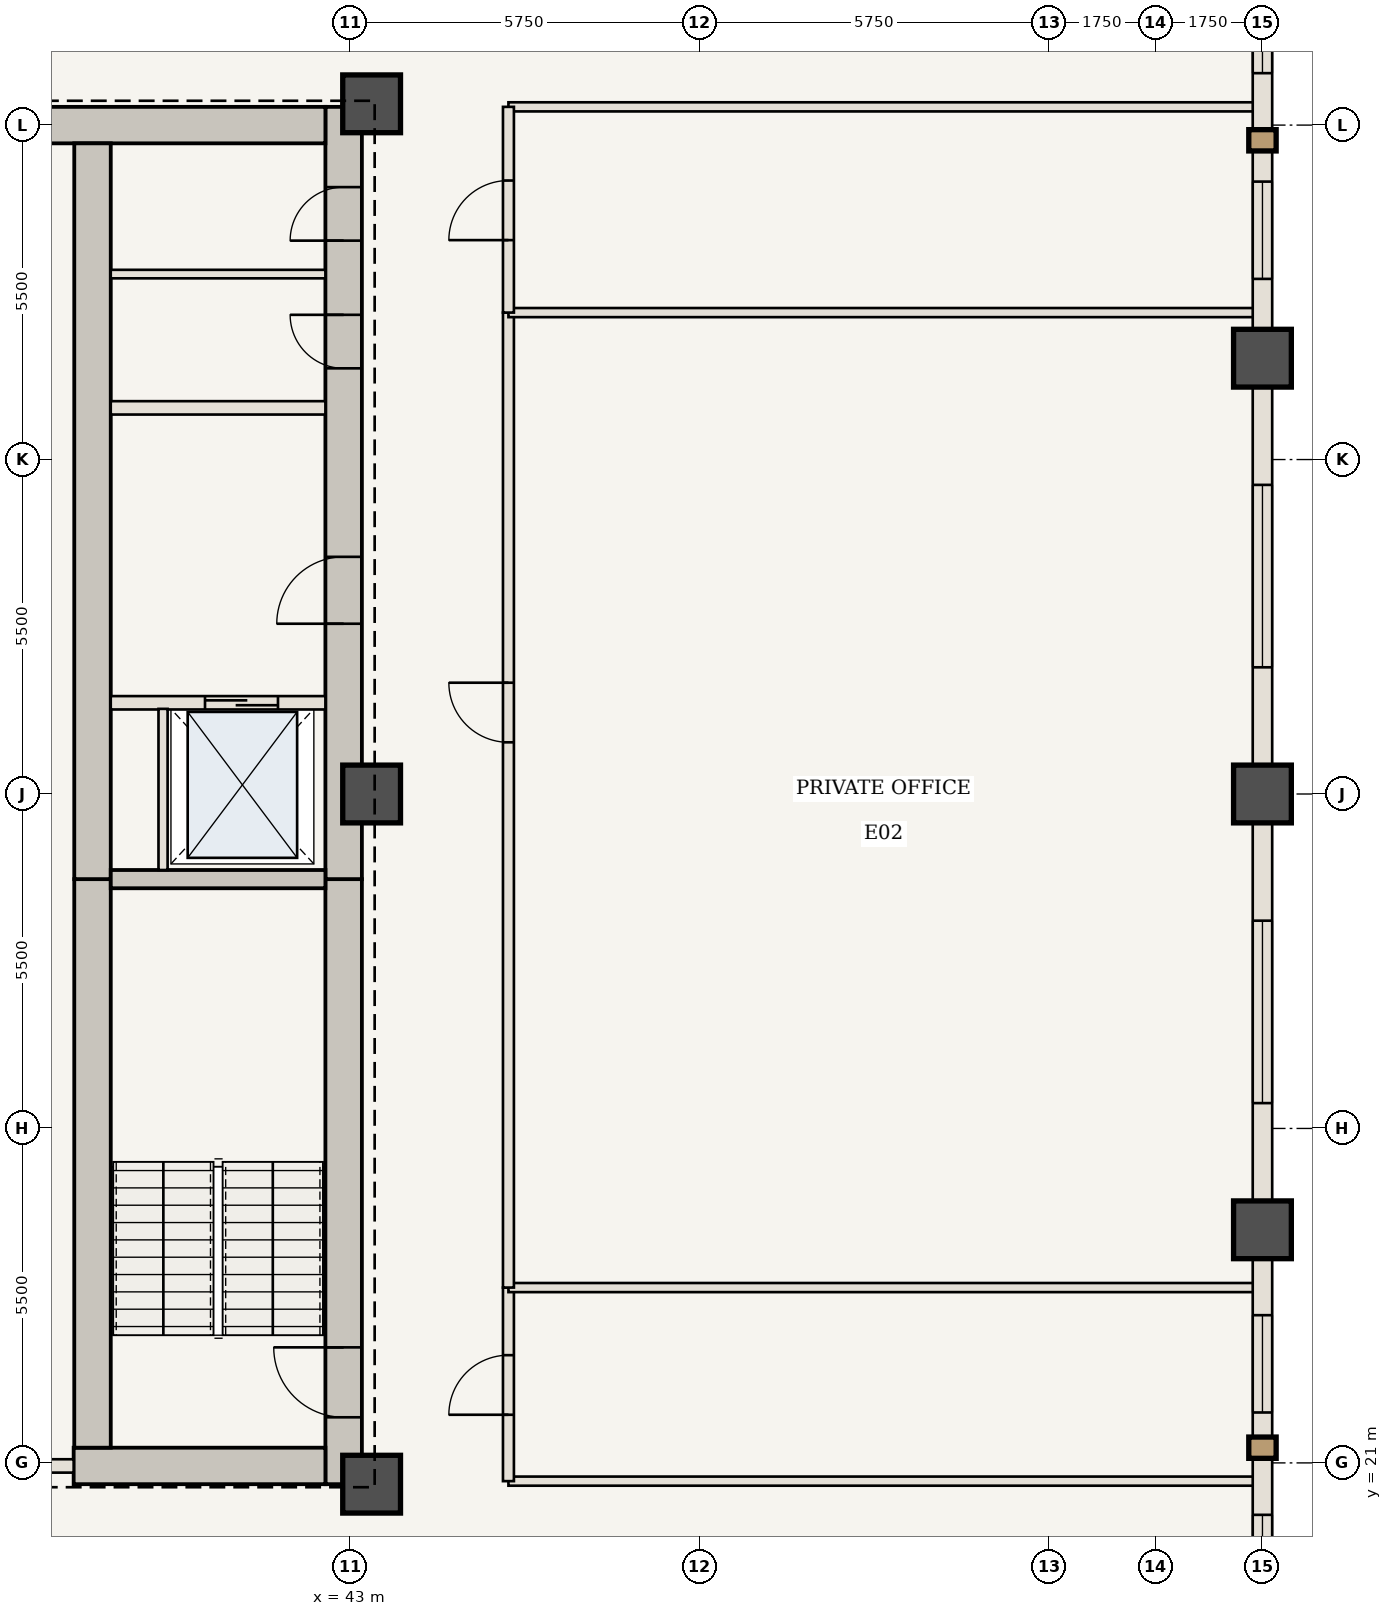
"""IFC4 building model, lengths in metres.
Left out: names, types, materials, properties, quantities, classifications, styles, units other than length and angle.
Written with IfcOpenShell. Run it as: python <this file> out.ifc"""

import sys

from ifc_helpers import new_model, si_unit, direction, frame, frame_2d, origin, origin_2d, place, context, subcontext, project, spatial, rectangle, extrude, element, fill, save


model = new_model("IFC4")
c1 = context("Model", 3, precision=1e-05, world=origin(), true_north=direction((0.0, 1.0)))
c2 = subcontext(c1, "Body", "Model", "MODEL_VIEW")
j1 = project(units=[si_unit("LENGTHUNIT", "METRE"), si_unit("PLANEANGLEUNIT", "RADIAN")], contexts=[c1])
p1 = place(None, origin())
s1 = spatial("IfcSite", under=j1, at=p1, CompositionType="ELEMENT")
p2 = place(p1, origin())
s2 = spatial("IfcBuilding", under=s1, at=p2, CompositionType="ELEMENT")
p3 = place(p2, frame((0.0, 0.0, 114.45)))
s3 = spatial("IfcBuildingStorey", under=s2, at=p3, CompositionType="ELEMENT", Elevation=114.45)
p4 = place(p3, frame((42.89, 20.65, 0.0), z_axis=(0.0, 0.0, 1.0), x_axis=(0.0, 1.0, 0.0)))
e1 = element("IfcWall", 1, at=p4, inside=s3, PredefinedType="SHEAR", context=c2, shape_type="SweptSolid", body=[
    extrude(rectangle(XDim=9.95, YDim=0.6, at=frame_2d((4.975, 0.0))), origin(), (0.0, 0.0, 1.0), 3.85),
])
p5 = place(p4, frame((1.1, 0.0, 0.0)))
e2 = element("IfcOpeningElement", 2, at=p5, cuts=e1, PredefinedType="OPENING", context=c2, shape_type="SweptSolid", body=[
    extrude(rectangle(XDim=1.15, YDim=2.15, at=frame_2d((0.575, 1.075))), frame((0.0, 0.31, 0.0), z_axis=(0.0, -1.0, 0.0), x_axis=(1.0, 0.0, 0.0)), (0.0, 0.0, 1.0), 0.62),
])
p6 = place(p3, frame((42.89, 30.6, 0.0), z_axis=(0.0, 0.0, 1.0), x_axis=(0.0, 1.0, 0.0)))
e3 = element("IfcWall", 3, at=p6, inside=s3, PredefinedType="SHEAR", context=c2, shape_type="SweptSolid", body=[
    extrude(rectangle(XDim=12.7, YDim=0.6, at=frame_2d((6.35, 0.0))), origin(), (0.0, 0.0, 1.0), 3.85),
])
p7 = place(p6, frame((4.2, 0.0, 0.0)))
e4 = element("IfcOpeningElement", 4, at=p7, cuts=e3, PredefinedType="OPENING", context=c2, shape_type="SweptSolid", body=[
    extrude(rectangle(XDim=1.1, YDim=2.15, at=frame_2d((0.55, 1.075))), frame((0.0, 0.31, 0.0), z_axis=(0.0, -1.0, 0.0), x_axis=(1.0, 0.0, 0.0)), (0.0, 0.0, 1.0), 0.62),
])
p8 = place(p6, frame((8.4, 0.0, 0.0)))
e5 = element("IfcOpeningElement", 5, at=p8, cuts=e3, PredefinedType="OPENING", context=c2, shape_type="SweptSolid", body=[
    extrude(rectangle(XDim=0.88, YDim=2.1, at=frame_2d((0.44, 1.05))), frame((0.0, 0.31, 0.0), z_axis=(0.0, -1.0, 0.0), x_axis=(1.0, 0.0, 0.0)), (0.0, 0.0, 1.0), 0.62),
])
p9 = place(p6, frame((10.5, 0.0, 0.0)))
e6 = element("IfcOpeningElement", 6, at=p9, cuts=e3, PredefinedType="OPENING", context=c2, shape_type="SweptSolid", body=[
    extrude(rectangle(XDim=0.88, YDim=2.1, at=frame_2d((0.44, 1.05))), frame((0.0, 0.31, 0.0), z_axis=(0.0, -1.0, 0.0), x_axis=(1.0, 0.0, 0.0)), (0.0, 0.0, 1.0), 0.62),
])
p10 = place(p3, frame((38.45, 20.95, 0.0), z_axis=(0.0, 0.0, 1.0), x_axis=(1.0, 0.0, 0.0)))
e7 = element("IfcWall", 7, at=p10, inside=s3, PredefinedType="SHEAR", context=c2, shape_type="SweptSolid", body=[
    extrude(rectangle(XDim=4.14, YDim=0.6, at=frame_2d((2.07, 0.0))), origin(), (0.0, 0.0, 1.0), 3.85),
])
p11 = place(p3, frame((37.75, 43.0, 0.0), z_axis=(0.0, 0.0, 1.0), x_axis=(1.0, 0.0, 0.0)))
e8 = element("IfcWall", 8, at=p11, inside=s3, PredefinedType="SHEAR", context=c2, shape_type="SweptSolid", body=[
    extrude(rectangle(XDim=4.84, YDim=0.6, at=frame_2d((2.42, 0.0))), origin(), (0.0, 0.0, 1.0), 3.85),
])
p12 = place(p3, frame((38.76, 21.25, 0.0), z_axis=(0.0, 0.0, 1.0), x_axis=(0.0, 1.0, 0.0)))
e9 = element("IfcWall", 9, at=p12, inside=s3, PredefinedType="SHEAR", context=c2, shape_type="SweptSolid", body=[
    extrude(rectangle(XDim=9.35, YDim=0.6, at=frame_2d((4.675, 0.0))), origin(), (0.0, 0.0, 1.0), 3.85),
])
p13 = place(p3, frame((38.76, 30.6, 0.0), z_axis=(0.0, 0.0, 1.0), x_axis=(0.0, 1.0, 0.0)))
e10 = element("IfcWall", 10, at=p13, inside=s3, PredefinedType="SHEAR", context=c2, shape_type="SweptSolid", body=[
    extrude(rectangle(XDim=12.1, YDim=0.6, at=frame_2d((6.05, 0.0))), origin(), (0.0, 0.0, 1.0), 3.85),
])
for number, where, z_axis, x_axis in (
    (11, (43.35, 20.65, 0.0), (0.0, 0.0, 1.0), (1.0, 0.0, 0.0)),
    (12, (43.35, 32.0, 0.0), (0.0, 0.0, 1.0), (1.0, 0.0, 0.0)),
    (13, (43.35, 43.35, 0.0), (0.0, 0.0, 1.0), (1.0, 0.0, 0.0)),
    (14, (58.0, 24.833, 0.0), (0.0, 0.0, 1.0), (1.0, 0.0, 0.0)),
    (15, (58.0, 32.0, 0.0), (0.0, 0.0, 1.0), (1.0, 0.0, 0.0)),
    (16, (58.0, 39.167, 0.0), (0.0, 0.0, 1.0), (1.0, 0.0, 0.0)),
):
    element("IfcColumn", number, at=place(p3, frame(where, z_axis=z_axis, x_axis=x_axis)), inside=s3, PredefinedType="COLUMN", context=c2, shape_type="SweptSolid", body=[
        extrude(rectangle(XDim=0.95, YDim=0.95, at=origin_2d()), origin(), (0.0, 0.0, 1.0), 3.85),
    ])
p14 = place(p3, frame((39.06, 30.6, 0.0), z_axis=(0.0, 0.0, 1.0), x_axis=(1.0, 0.0, 0.0)))
e17 = element("IfcWall", 17, at=p14, inside=s3, PredefinedType="SHEAR", context=c2, shape_type="SweptSolid", body=[
    extrude(rectangle(XDim=3.53, YDim=0.3, at=frame_2d((1.765, 0.0))), origin(), (0.0, 0.0, 1.0), 3.685),
])
p15 = place(p3, frame((39.06, 33.5, 0.0), z_axis=(0.0, 0.0, 1.0), x_axis=(1.0, 0.0, 0.0)))
e18 = element("IfcWall", 18, at=p15, inside=s3, PredefinedType="STANDARD", context=c2, shape_type="SweptSolid", body=[
    extrude(rectangle(XDim=3.53, YDim=0.22, at=frame_2d((1.765, 0.0))), origin(), (0.0, 0.0, 1.0), 3.685),
])
p16 = place(p15, frame((1.55, 0.0, 0.0)))
e19 = element("IfcOpeningElement", 19, at=p16, cuts=e18, PredefinedType="OPENING", context=c2, shape_type="SweptSolid", body=[
    extrude(rectangle(XDim=1.2, YDim=2.2, at=frame_2d((0.6, 1.1))), frame((0.0, 0.12, 0.0), z_axis=(0.0, -1.0, 0.0), x_axis=(1.0, 0.0, 0.0)), (0.0, 0.0, 1.0), 0.24),
])
p17 = place(p3, frame((39.92, 30.75, 0.0), z_axis=(0.0, 0.0, 1.0), x_axis=(0.0, 1.0, 0.0)))
e20 = element("IfcWall", 20, at=p17, inside=s3, PredefinedType="STANDARD", context=c2, shape_type="SweptSolid", body=[
    extrude(rectangle(XDim=2.65, YDim=0.15, at=frame_2d((1.325, 0.0))), origin(), (0.0, 0.0, 1.0), 3.685),
])
p18 = place(p3, frame((39.06, 38.35, 0.0), z_axis=(0.0, 0.0, 1.0), x_axis=(1.0, 0.0, 0.0)))
e21 = element("IfcWall", 21, at=p18, inside=s3, PredefinedType="STANDARD", context=c2, shape_type="SweptSolid", body=[
    extrude(rectangle(XDim=3.53, YDim=0.22, at=frame_2d((1.765, 0.0))), origin(), (0.0, 0.0, 1.0), 3.685),
])
p19 = place(p3, frame((39.06, 40.55, 0.0), z_axis=(0.0, 0.0, 1.0), x_axis=(1.0, 0.0, 0.0)))
e22 = element("IfcWall", 22, at=p19, inside=s3, PredefinedType="STANDARD", context=c2, shape_type="SweptSolid", body=[
    extrude(rectangle(XDim=3.53, YDim=0.14, at=frame_2d((1.765, 0.0))), origin(), (0.0, 0.0, 1.0), 3.685),
])
p20 = place(p3, frame((35.15, 20.95, 0.0), z_axis=(0.0, 0.0, 1.0), x_axis=(1.0, 0.0, 0.0)))
e23 = element("IfcWall", 23, at=p20, inside=s3, PredefinedType="STANDARD", context=c2, shape_type="SweptSolid", body=[
    extrude(rectangle(XDim=3.3, YDim=0.22, at=frame_2d((1.65, 0.0))), origin(), (0.0, 0.0, 1.0), 3.685),
])
p21 = place(p20, frame((1.1, 0.0, 0.0)))
e24 = element("IfcOpeningElement", 24, at=p21, cuts=e23, PredefinedType="OPENING", context=c2, shape_type="SweptSolid", body=[
    extrude(rectangle(XDim=1.1, YDim=2.15, at=frame_2d((0.55, 1.075))), frame((0.0, 0.12, 0.0), z_axis=(0.0, -1.0, 0.0), x_axis=(1.0, 0.0, 0.0)), (0.0, 0.0, 1.0), 0.24),
])
for number, where, z_axis, x_axis in (
    (25, (45.6, 20.7, 0.0), (0.0, 0.0, 1.0), (1.0, 0.0, 0.0)),
    (26, (45.6, 43.3, 0.0), (0.0, 0.0, 1.0), (1.0, 0.0, 0.0)),
):
    element("IfcWall", number, at=place(p3, frame(where, z_axis=z_axis, x_axis=x_axis)), inside=s3, PredefinedType="STANDARD", context=c2, shape_type="SweptSolid", body=[
        extrude(rectangle(XDim=12.34, YDim=0.15, at=frame_2d((6.17, 0.0))), origin(), (0.0, 0.0, 1.0), 3.065),
    ])
p22 = place(p3, frame((45.6, 20.7, 0.0), z_axis=(0.0, 0.0, 1.0), x_axis=(0.0, 1.0, 0.0)))
e27 = element("IfcWall", 27, at=p22, inside=s3, PredefinedType="STANDARD", context=c2, shape_type="SweptSolid", body=[
    extrude(rectangle(XDim=3.183, YDim=0.18, at=frame_2d((1.592, 0.0))), origin(), (0.0, 0.0, 1.0), 3.685),
])
p23 = place(p22, frame((1.092, 0.0, 0.0)))
e28 = element("IfcOpeningElement", 28, at=p23, cuts=e27, PredefinedType="OPENING", context=c2, shape_type="SweptSolid", body=[
    extrude(rectangle(XDim=0.98, YDim=2.2, at=frame_2d((0.49, 1.1))), frame((0.0, 0.1, 0.0), z_axis=(0.0, -1.0, 0.0), x_axis=(1.0, 0.0, 0.0)), (0.0, 0.0, 1.0), 0.2),
])
p24 = place(p3, frame((45.6, 23.883, 0.0), z_axis=(0.0, 0.0, 1.0), x_axis=(1.0, 0.0, 0.0)))
e29 = element("IfcWall", 29, at=p24, inside=s3, PredefinedType="STANDARD", context=c2, shape_type="SweptSolid", body=[
    extrude(rectangle(XDim=12.34, YDim=0.15, at=frame_2d((6.17, 0.0))), origin(), (0.0, 0.0, 1.0), 3.685),
])
p25 = place(p3, frame((45.6, 23.883, 0.0), z_axis=(0.0, 0.0, 1.0), x_axis=(0.0, 1.0, 0.0)))
e30 = element("IfcWall", 30, at=p25, inside=s3, PredefinedType="STANDARD", context=c2, shape_type="SweptSolid", body=[
    extrude(rectangle(XDim=16.033, YDim=0.18, at=frame_2d((8.017, 0.0))), origin(), (0.0, 0.0, 1.0), 3.685),
])
p26 = place(p25, frame((8.967, 0.0, 0.0)))
e31 = element("IfcOpeningElement", 31, at=p26, cuts=e30, PredefinedType="OPENING", context=c2, shape_type="SweptSolid", body=[
    extrude(rectangle(XDim=0.98, YDim=2.2, at=frame_2d((0.49, 1.1))), frame((0.0, 0.1, 0.0), z_axis=(0.0, -1.0, 0.0), x_axis=(1.0, 0.0, 0.0)), (0.0, 0.0, 1.0), 0.2),
])
p27 = place(p3, frame((45.6, 39.917, 0.0), z_axis=(0.0, 0.0, 1.0), x_axis=(1.0, 0.0, 0.0)))
e32 = element("IfcWall", 32, at=p27, inside=s3, PredefinedType="STANDARD", context=c2, shape_type="SweptSolid", body=[
    extrude(rectangle(XDim=12.34, YDim=0.15, at=frame_2d((6.17, 0.0))), origin(), (0.0, 0.0, 1.0), 3.685),
])
p28 = place(p3, frame((45.6, 39.917, 0.0), z_axis=(0.0, 0.0, 1.0), x_axis=(0.0, 1.0, 0.0)))
e33 = element("IfcWall", 33, at=p28, inside=s3, PredefinedType="STANDARD", context=c2, shape_type="SweptSolid", body=[
    extrude(rectangle(XDim=3.383, YDim=0.18, at=frame_2d((1.692, 0.0))), origin(), (0.0, 0.0, 1.0), 3.685),
])
p29 = place(p28, frame((1.192, 0.0, 0.0)))
e34 = element("IfcOpeningElement", 34, at=p29, cuts=e33, PredefinedType="OPENING", context=c2, shape_type="SweptSolid", body=[
    extrude(rectangle(XDim=0.98, YDim=2.2, at=frame_2d((0.49, 1.1))), frame((0.0, 0.1, 0.0), z_axis=(0.0, -1.0, 0.0), x_axis=(1.0, 0.0, 0.0)), (0.0, 0.0, 1.0), 0.2),
])
p30 = place(p3, frame((58.0, 24.833, 0.0), z_axis=(0.0, 0.0, 1.0), x_axis=(0.0, -1.0, 0.0)))
e35 = element("IfcWall", 35, at=p30, inside=s3, PredefinedType="USERDEFINED", context=c2, shape_type="SweptSolid", body=[
    extrude(rectangle(XDim=7.167, YDim=0.32, at=frame_2d((3.583, 0.0))), origin(), (0.0, 0.0, 1.0), 2.885),
])
p31 = place(p30, frame((1.404, 0.0, 0.85)))
e36 = element("IfcOpeningElement", 36, at=p31, cuts=e35, PredefinedType="OPENING", context=c2, shape_type="SweptSolid", body=[
    extrude(rectangle(XDim=1.6, YDim=1.835, at=frame_2d((0.8, 0.917))), frame((0.0, 0.17, 0.0), z_axis=(0.0, -1.0, 0.0), x_axis=(1.0, 0.0, 0.0)), (0.0, 0.0, 1.0), 0.34),
])
p32 = place(p30, frame((4.688, 0.0, 0.85)))
e37 = element("IfcOpeningElement", 37, at=p32, cuts=e35, PredefinedType="OPENING", context=c2, shape_type="SweptSolid", body=[
    extrude(rectangle(XDim=1.6, YDim=1.835, at=frame_2d((0.8, 0.917))), frame((0.0, 0.17, 0.0), z_axis=(0.0, -1.0, 0.0), x_axis=(1.0, 0.0, 0.0)), (0.0, 0.0, 1.0), 0.34),
])
p33 = place(p3, frame((58.0, 32.0, 0.0), z_axis=(0.0, 0.0, 1.0), x_axis=(0.0, -1.0, 0.0)))
e38 = element("IfcWall", 38, at=p33, inside=s3, PredefinedType="USERDEFINED", context=c2, shape_type="SweptSolid", body=[
    extrude(rectangle(XDim=7.167, YDim=0.32, at=frame_2d((3.583, 0.0))), origin(), (0.0, 0.0, 1.0), 2.885),
])
p34 = place(p33, frame((2.083, 0.0, 0.85)))
e39 = element("IfcOpeningElement", 39, at=p34, cuts=e38, PredefinedType="OPENING", context=c2, shape_type="SweptSolid", body=[
    extrude(rectangle(XDim=3.0, YDim=1.835, at=frame_2d((1.5, 0.917))), frame((0.0, 0.17, 0.0), z_axis=(0.0, -1.0, 0.0), x_axis=(1.0, 0.0, 0.0)), (0.0, 0.0, 1.0), 0.34),
])
p35 = place(p3, frame((58.0, 39.167, 0.0), z_axis=(0.0, 0.0, 1.0), x_axis=(0.0, -1.0, 0.0)))
e40 = element("IfcWall", 40, at=p35, inside=s3, PredefinedType="USERDEFINED", context=c2, shape_type="SweptSolid", body=[
    extrude(rectangle(XDim=7.167, YDim=0.32, at=frame_2d((3.583, 0.0))), origin(), (0.0, 0.0, 1.0), 2.885),
])
p36 = place(p35, frame((2.083, 0.0, 0.85)))
e41 = element("IfcOpeningElement", 41, at=p36, cuts=e40, PredefinedType="OPENING", context=c2, shape_type="SweptSolid", body=[
    extrude(rectangle(XDim=3.0, YDim=1.835, at=frame_2d((1.5, 0.917))), frame((0.0, 0.17, 0.0), z_axis=(0.0, -1.0, 0.0), x_axis=(1.0, 0.0, 0.0)), (0.0, 0.0, 1.0), 0.34),
])
p37 = place(p3, frame((58.0, 46.333, 0.0), z_axis=(0.0, 0.0, 1.0), x_axis=(0.0, -1.0, 0.0)))
e42 = element("IfcWall", 42, at=p37, inside=s3, PredefinedType="USERDEFINED", context=c2, shape_type="SweptSolid", body=[
    extrude(rectangle(XDim=7.167, YDim=0.32, at=frame_2d((3.583, 0.0))), origin(), (0.0, 0.0, 1.0), 2.885),
])
p38 = place(p37, frame((0.879, 0.0, 0.85)))
e43 = element("IfcOpeningElement", 43, at=p38, cuts=e42, PredefinedType="OPENING", context=c2, shape_type="SweptSolid", body=[
    extrude(rectangle(XDim=1.6, YDim=1.835, at=frame_2d((0.8, 0.917))), frame((0.0, 0.17, 0.0), z_axis=(0.0, -1.0, 0.0), x_axis=(1.0, 0.0, 0.0)), (0.0, 0.0, 1.0), 0.34),
])
p39 = place(p37, frame((4.262, 0.0, 0.85)))
e44 = element("IfcOpeningElement", 44, at=p39, cuts=e42, PredefinedType="OPENING", context=c2, shape_type="SweptSolid", body=[
    extrude(rectangle(XDim=1.6, YDim=1.835, at=frame_2d((0.8, 0.917))), frame((0.0, 0.17, 0.0), z_axis=(0.0, -1.0, 0.0), x_axis=(1.0, 0.0, 0.0)), (0.0, 0.0, 1.0), 0.34),
])
p40 = place(p5, origin())
e45 = element("IfcDoor", 45, at=p40, inside=s3, OperationType="SINGLE_SWING_RIGHT", PredefinedType="DOOR", context=c2, shape_type="SweptSolid", body=[
    extrude(rectangle(XDim=1.15, YDim=2.15, at=frame_2d((0.575, 1.075))), frame((0.0, 0.025, 0.0), z_axis=(0.0, -1.0, 0.0), x_axis=(1.0, 0.0, 0.0)), (0.0, 0.0, 1.0), 0.05),
])
fill(e2, e45)
p41 = place(p7, origin())
e46 = element("IfcDoor", 46, at=p41, inside=s3, OperationType="SINGLE_SWING_LEFT", PredefinedType="DOOR", context=c2, shape_type="SweptSolid", body=[
    extrude(rectangle(XDim=1.1, YDim=2.15, at=frame_2d((0.55, 1.075))), frame((0.0, 0.025, 0.0), z_axis=(0.0, -1.0, 0.0), x_axis=(1.0, 0.0, 0.0)), (0.0, 0.0, 1.0), 0.05),
])
fill(e4, e46)
p42 = place(p8, origin())
e47 = element("IfcDoor", 47, at=p42, inside=s3, OperationType="SINGLE_SWING_RIGHT", PredefinedType="DOOR", context=c2, shape_type="SweptSolid", body=[
    extrude(rectangle(XDim=0.88, YDim=2.1, at=frame_2d((0.44, 1.05))), frame((0.0, 0.025, 0.0), z_axis=(0.0, -1.0, 0.0), x_axis=(1.0, 0.0, 0.0)), (0.0, 0.0, 1.0), 0.05),
])
fill(e5, e47)
p43 = place(p9, origin())
e48 = element("IfcDoor", 48, at=p43, inside=s3, OperationType="SINGLE_SWING_LEFT", PredefinedType="DOOR", context=c2, shape_type="SweptSolid", body=[
    extrude(rectangle(XDim=0.88, YDim=2.1, at=frame_2d((0.44, 1.05))), frame((0.0, 0.025, 0.0), z_axis=(0.0, -1.0, 0.0), x_axis=(1.0, 0.0, 0.0)), (0.0, 0.0, 1.0), 0.05),
])
fill(e6, e48)
p44 = place(p16, origin())
e49 = element("IfcDoor", 49, at=p44, inside=s3, OperationType="DOUBLE_DOOR_SLIDING", PredefinedType="DOOR", context=c2, shape_type="SweptSolid", body=[
    extrude(rectangle(XDim=1.2, YDim=2.2, at=frame_2d((0.6, 1.1))), frame((0.0, 0.025, 0.0), z_axis=(0.0, -1.0, 0.0), x_axis=(1.0, 0.0, 0.0)), (0.0, 0.0, 1.0), 0.05),
])
fill(e19, e49)
p45 = place(p23, origin())
e50 = element("IfcDoor", 50, at=p45, inside=s3, OperationType="SINGLE_SWING_LEFT", PredefinedType="DOOR", context=c2, shape_type="SweptSolid", body=[
    extrude(rectangle(XDim=0.98, YDim=2.2, at=frame_2d((0.49, 1.1))), frame((0.0, 0.025, 0.0), z_axis=(0.0, -1.0, 0.0), x_axis=(1.0, 0.0, 0.0)), (0.0, 0.0, 1.0), 0.05),
])
fill(e28, e50)
p46 = place(p26, origin())
e51 = element("IfcDoor", 51, at=p46, inside=s3, OperationType="SINGLE_SWING_RIGHT", PredefinedType="DOOR", context=c2, shape_type="SweptSolid", body=[
    extrude(rectangle(XDim=0.98, YDim=2.2, at=frame_2d((0.49, 1.1))), frame((0.0, 0.025, 0.0), z_axis=(0.0, -1.0, 0.0), x_axis=(1.0, 0.0, 0.0)), (0.0, 0.0, 1.0), 0.05),
])
fill(e31, e51)
p47 = place(p29, origin())
e52 = element("IfcDoor", 52, at=p47, inside=s3, OperationType="SINGLE_SWING_LEFT", PredefinedType="DOOR", context=c2, shape_type="SweptSolid", body=[
    extrude(rectangle(XDim=0.98, YDim=2.2, at=frame_2d((0.49, 1.1))), frame((0.0, 0.025, 0.0), z_axis=(0.0, -1.0, 0.0), x_axis=(1.0, 0.0, 0.0)), (0.0, 0.0, 1.0), 0.05),
])
fill(e34, e52)
p48 = place(p31, origin())
e53 = element("IfcWindow", 53, at=p48, inside=s3, PartitioningType="SINGLE_PANEL", PredefinedType="WINDOW", context=c2, shape_type="SweptSolid", body=[
    extrude(rectangle(XDim=1.6, YDim=1.835, at=frame_2d((0.8, 0.917))), frame((0.0, 0.03, 0.0), z_axis=(0.0, -1.0, 0.0), x_axis=(1.0, 0.0, 0.0)), (0.0, 0.0, 1.0), 0.06),
])
fill(e36, e53)
p49 = place(p32, origin())
e54 = element("IfcWindow", 54, at=p49, inside=s3, PartitioningType="SINGLE_PANEL", PredefinedType="WINDOW", context=c2, shape_type="SweptSolid", body=[
    extrude(rectangle(XDim=1.6, YDim=1.835, at=frame_2d((0.8, 0.917))), frame((0.0, 0.03, 0.0), z_axis=(0.0, -1.0, 0.0), x_axis=(1.0, 0.0, 0.0)), (0.0, 0.0, 1.0), 0.06),
])
fill(e37, e54)
p50 = place(p34, origin())
e55 = element("IfcWindow", 55, at=p50, inside=s3, PartitioningType="SINGLE_PANEL", PredefinedType="WINDOW", context=c2, shape_type="SweptSolid", body=[
    extrude(rectangle(XDim=3.0, YDim=1.835, at=frame_2d((1.5, 0.917))), frame((0.0, 0.03, 0.0), z_axis=(0.0, -1.0, 0.0), x_axis=(1.0, 0.0, 0.0)), (0.0, 0.0, 1.0), 0.06),
])
fill(e39, e55)
p51 = place(p36, origin())
e56 = element("IfcWindow", 56, at=p51, inside=s3, PartitioningType="SINGLE_PANEL", PredefinedType="WINDOW", context=c2, shape_type="SweptSolid", body=[
    extrude(rectangle(XDim=3.0, YDim=1.835, at=frame_2d((1.5, 0.917))), frame((0.0, 0.03, 0.0), z_axis=(0.0, -1.0, 0.0), x_axis=(1.0, 0.0, 0.0)), (0.0, 0.0, 1.0), 0.06),
])
fill(e41, e56)
p52 = place(p38, origin())
e57 = element("IfcWindow", 57, at=p52, inside=s3, PartitioningType="SINGLE_PANEL", PredefinedType="WINDOW", context=c2, shape_type="SweptSolid", body=[
    extrude(rectangle(XDim=1.6, YDim=1.835, at=frame_2d((0.8, 0.917))), frame((0.0, 0.03, 0.0), z_axis=(0.0, -1.0, 0.0), x_axis=(1.0, 0.0, 0.0)), (0.0, 0.0, 1.0), 0.06),
])
fill(e43, e57)
p53 = place(p39, origin())
e58 = element("IfcWindow", 58, at=p53, inside=s3, PartitioningType="SINGLE_PANEL", PredefinedType="WINDOW", context=c2, shape_type="SweptSolid", body=[
    extrude(rectangle(XDim=1.6, YDim=1.835, at=frame_2d((0.8, 0.917))), frame((0.0, 0.03, 0.0), z_axis=(0.0, -1.0, 0.0), x_axis=(1.0, 0.0, 0.0)), (0.0, 0.0, 1.0), 0.06),
])
fill(e44, e58)
save(model, sys.argv[1])
